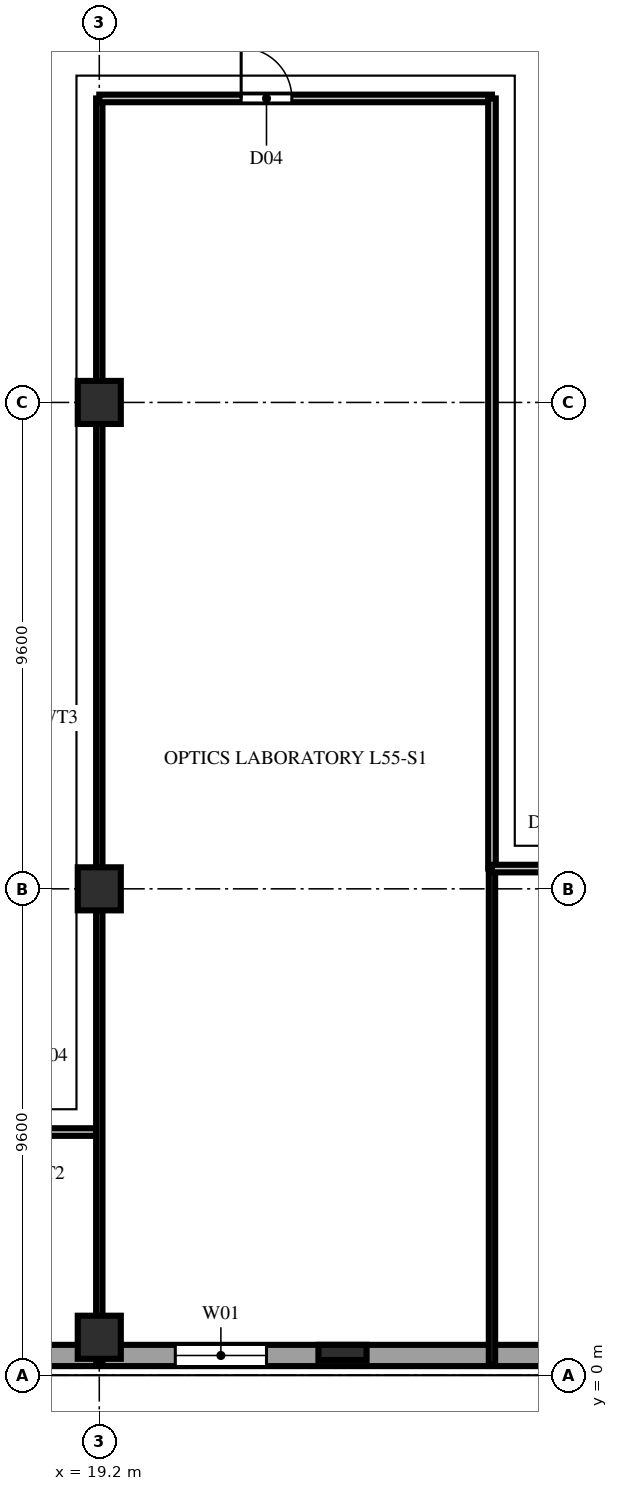
"""IFC4 building model, lengths in metres.
Left out: names, types, materials, properties, quantities, classifications, styles, units other than length and angle.
Written with IfcOpenShell. Run it as: python <this file> out.ifc"""

import sys

from ifc_helpers import new_model, si_unit, direction, frame, frame_2d, origin, origin_2d, place, context, subcontext, project, spatial, rectangle, extrude, element, fill, save


model = new_model("IFC4")
c1 = context("Model", 3, precision=1e-05, world=origin(), true_north=direction((0.0, 1.0)))
c2 = subcontext(c1, "Body", "Model", "MODEL_VIEW")
j1 = project(units=[si_unit("LENGTHUNIT", "METRE"), si_unit("PLANEANGLEUNIT", "RADIAN")], contexts=[c1])
p1 = place(None, origin())
s1 = spatial("IfcSite", under=j1, at=p1, CompositionType="ELEMENT")
p2 = place(p1, origin())
s2 = spatial("IfcBuilding", under=s1, at=p2, CompositionType="ELEMENT")
p3 = place(p2, frame((0.0, 0.0, 218.0)))
s3 = spatial("IfcBuildingStorey", under=s2, at=p3, CompositionType="ELEMENT", Elevation=218.0)
for number, where, z_axis, x_axis in (
    (1, (19.2, 0.75, 0.0), (0.0, 0.0, 1.0), (1.0, 0.0, 0.0)),
    (2, (19.2, 9.6, 0.0), (0.0, 0.0, 1.0), (1.0, 0.0, 0.0)),
    (3, (19.2, 19.2, 0.0), (0.0, 0.0, 1.0), (1.0, 0.0, 0.0)),
):
    element("IfcColumn", number, at=place(p3, frame(where, z_axis=z_axis, x_axis=x_axis)), inside=s3, PredefinedType="COLUMN", context=c2, shape_type="SweptSolid", body=[
        extrude(rectangle(XDim=0.85, YDim=0.85, at=origin_2d()), origin(), (0.0, 0.0, 1.0), 3.8),
    ])
p4 = place(p3, frame((24.0, 0.45, 0.0), z_axis=(0.0, 0.0, 1.0), x_axis=(1.0, 0.0, 0.0)))
e4 = element("IfcColumn", 4, at=p4, inside=s3, PredefinedType="PILASTER", context=c2, shape_type="SweptSolid", body=[
    extrude(rectangle(XDim=0.95, YDim=0.3, at=origin_2d()), origin(), (0.0, 0.0, 1.0), 3.8),
])
p5 = place(p3, frame((1.84, 0.39, 0.0), z_axis=(0.0, 0.0, 1.0), x_axis=(1.0, 0.0, 0.0)))
e5 = element("IfcWall", 5, at=p5, inside=s3, PredefinedType="SOLIDWALL", context=c2, shape_type="SweptSolid", body=[
    extrude(rectangle(XDim=53.92, YDim=0.42, at=frame_2d((26.96, 0.0))), origin(), (0.0, 0.0, 1.0), 3.54),
])
p6 = place(p5, frame((4.46, 0.0, 0.85)))
e6 = element("IfcOpeningElement", 6, at=p6, cuts=e5, PredefinedType="OPENING", context=c2, shape_type="SweptSolid", body=[
    extrude(rectangle(XDim=1.8, YDim=1.85, at=frame_2d((0.9, 0.925))), frame((0.0, 0.222, 0.0), z_axis=(0.0, -1.0, 0.0), x_axis=(1.0, 0.0, 0.0)), (0.0, 0.0, 1.0), 0.444),
])
p7 = place(p5, frame((9.26, 0.0, 0.85)))
e7 = element("IfcOpeningElement", 7, at=p7, cuts=e5, PredefinedType="OPENING", context=c2, shape_type="SweptSolid", body=[
    extrude(rectangle(XDim=1.8, YDim=1.85, at=frame_2d((0.9, 0.925))), frame((0.0, 0.222, 0.0), z_axis=(0.0, -1.0, 0.0), x_axis=(1.0, 0.0, 0.0)), (0.0, 0.0, 1.0), 0.444),
])
p8 = place(p5, frame((18.86, 0.0, 0.85)))
e8 = element("IfcOpeningElement", 8, at=p8, cuts=e5, PredefinedType="OPENING", context=c2, shape_type="SweptSolid", body=[
    extrude(rectangle(XDim=1.8, YDim=1.85, at=frame_2d((0.9, 0.925))), frame((0.0, 0.222, 0.0), z_axis=(0.0, -1.0, 0.0), x_axis=(1.0, 0.0, 0.0)), (0.0, 0.0, 1.0), 0.444),
])
p9 = place(p5, frame((28.46, 0.0, 0.85)))
e9 = element("IfcOpeningElement", 9, at=p9, cuts=e5, PredefinedType="OPENING", context=c2, shape_type="SweptSolid", body=[
    extrude(rectangle(XDim=1.8, YDim=1.85, at=frame_2d((0.9, 0.925))), frame((0.0, 0.222, 0.0), z_axis=(0.0, -1.0, 0.0), x_axis=(1.0, 0.0, 0.0)), (0.0, 0.0, 1.0), 0.444),
])
p10 = place(p5, frame((33.26, 0.0, 0.85)))
e10 = element("IfcOpeningElement", 10, at=p10, cuts=e5, PredefinedType="OPENING", context=c2, shape_type="SweptSolid", body=[
    extrude(rectangle(XDim=1.8, YDim=1.85, at=frame_2d((0.9, 0.925))), frame((0.0, 0.222, 0.0), z_axis=(0.0, -1.0, 0.0), x_axis=(1.0, 0.0, 0.0)), (0.0, 0.0, 1.0), 0.444),
])
p11 = place(p5, frame((38.06, 0.0, 0.85)))
e11 = element("IfcOpeningElement", 11, at=p11, cuts=e5, PredefinedType="OPENING", context=c2, shape_type="SweptSolid", body=[
    extrude(rectangle(XDim=1.8, YDim=1.85, at=frame_2d((0.9, 0.925))), frame((0.0, 0.222, 0.0), z_axis=(0.0, -1.0, 0.0), x_axis=(1.0, 0.0, 0.0)), (0.0, 0.0, 1.0), 0.444),
])
p12 = place(p5, frame((42.86, 0.0, 0.85)))
e12 = element("IfcOpeningElement", 12, at=p12, cuts=e5, PredefinedType="OPENING", context=c2, shape_type="SweptSolid", body=[
    extrude(rectangle(XDim=1.8, YDim=1.85, at=frame_2d((0.9, 0.925))), frame((0.0, 0.222, 0.0), z_axis=(0.0, -1.0, 0.0), x_axis=(1.0, 0.0, 0.0)), (0.0, 0.0, 1.0), 0.444),
])
p13 = place(p5, frame((47.66, 0.0, 0.85)))
e13 = element("IfcOpeningElement", 13, at=p13, cuts=e5, PredefinedType="OPENING", context=c2, shape_type="SweptSolid", body=[
    extrude(rectangle(XDim=1.8, YDim=1.85, at=frame_2d((0.9, 0.925))), frame((0.0, 0.222, 0.0), z_axis=(0.0, -1.0, 0.0), x_axis=(1.0, 0.0, 0.0)), (0.0, 0.0, 1.0), 0.444),
])
p14 = place(p3, frame((17.05, 4.8, 0.0), z_axis=(0.0, 0.0, 1.0), x_axis=(1.0, 0.0, 0.0)))
e14 = element("IfcWall", 14, at=p14, inside=s3, PredefinedType="PARTITIONING", context=c2, shape_type="SweptSolid", body=[
    extrude(rectangle(XDim=2.15, YDim=0.15, at=frame_2d((1.075, 0.0))), origin(), (0.0, 0.0, 1.0), 3.54),
])
p15 = place(p3, frame((19.2, 0.22, 0.0), z_axis=(0.0, 0.0, 1.0), x_axis=(0.0, 1.0, 0.0)))
e15 = element("IfcWall", 15, at=p15, inside=s3, PredefinedType="PARTITIONING", context=c2, shape_type="SweptSolid", body=[
    extrude(rectangle(XDim=0.53, YDim=0.125, at=frame_2d((0.265, 0.0))), origin(), (0.0, 0.0, 1.0), 3.54),
])
p16 = place(p3, frame((19.2, 0.75, 0.0), z_axis=(0.0, 0.0, 1.0), x_axis=(0.0, 1.0, 0.0)))
e16 = element("IfcWall", 16, at=p16, inside=s3, PredefinedType="PARTITIONING", context=c2, shape_type="SweptSolid", body=[
    extrude(rectangle(XDim=24.45, YDim=0.125, at=frame_2d((12.225, 0.0))), origin(), (0.0, 0.0, 1.0), 2.924),
])
p17 = place(p3, frame((19.2, 25.2, 0.0), z_axis=(0.0, 0.0, 1.0), x_axis=(1.0, 0.0, 0.0)))
e17 = element("IfcWall", 17, at=p17, inside=s3, PredefinedType="PARTITIONING", context=c2, shape_type="SweptSolid", body=[
    extrude(rectangle(XDim=7.75, YDim=0.15, at=frame_2d((3.875, 0.0))), origin(), (0.0, 0.0, 1.0), 3.54),
])
p18 = place(p17, frame((2.8, 0.0, 0.0)))
e18 = element("IfcOpeningElement", 18, at=p18, cuts=e17, PredefinedType="OPENING", context=c2, shape_type="SweptSolid", body=[
    extrude(rectangle(XDim=1.0, YDim=2.2, at=frame_2d((0.5, 1.1))), frame((0.0, 0.087, 0.0), z_axis=(0.0, -1.0, 0.0), x_axis=(1.0, 0.0, 0.0)), (0.0, 0.0, 1.0), 0.174),
])
p19 = place(p3, frame((26.95, 0.22, 0.0), z_axis=(0.0, 0.0, 1.0), x_axis=(0.0, 1.0, 0.0)))
e19 = element("IfcWall", 19, at=p19, inside=s3, PredefinedType="PARTITIONING", context=c2, shape_type="SweptSolid", body=[
    extrude(rectangle(XDim=9.78, YDim=0.125, at=frame_2d((4.89, 0.0))), origin(), (0.0, 0.0, 1.0), 3.54),
])
p20 = place(p3, frame((26.95, 10.0, 0.0), z_axis=(0.0, 0.0, 1.0), x_axis=(0.0, 1.0, 0.0)))
e20 = element("IfcWall", 20, at=p20, inside=s3, PredefinedType="PARTITIONING", context=c2, shape_type="SweptSolid", body=[
    extrude(rectangle(XDim=15.2, YDim=0.15, at=frame_2d((7.6, 0.0))), origin(), (0.0, 0.0, 1.0), 3.54),
])
p21 = place(p3, frame((26.95, 10.0, 0.0), z_axis=(0.0, 0.0, 1.0), x_axis=(1.0, 0.0, 0.0)))
e21 = element("IfcWall", 21, at=p21, inside=s3, PredefinedType="PARTITIONING", context=c2, shape_type="SweptSolid", body=[
    extrude(rectangle(XDim=2.63, YDim=0.15, at=frame_2d((1.315, 0.0))), origin(), (0.0, 0.0, 1.0), 3.54),
])
p22 = place(p8, origin())
e22 = element("IfcWindow", 22, at=p22, inside=s3, PartitioningType="DOUBLE_PANEL_VERTICAL", PredefinedType="WINDOW", context=c2, shape_type="SweptSolid", body=[
    extrude(rectangle(XDim=1.8, YDim=1.85, at=frame_2d((0.9, 0.925))), frame((0.0, 0.11, 0.0), z_axis=(0.0, -1.0, 0.0), x_axis=(1.0, 0.0, 0.0)), (0.0, 0.0, 1.0), 0.06),
])
fill(e8, e22)
p23 = place(p18, origin())
e23 = element("IfcDoor", 23, at=p23, inside=s3, OperationType="SINGLE_SWING_LEFT", PredefinedType="DOOR", context=c2, shape_type="SweptSolid", body=[
    extrude(rectangle(XDim=1.0, YDim=2.2, at=frame_2d((0.5, 1.1))), frame((0.0, 0.025, 0.0), z_axis=(0.0, -1.0, 0.0), x_axis=(1.0, 0.0, 0.0)), (0.0, 0.0, 1.0), 0.05),
])
fill(e18, e23)
save(model, sys.argv[1])
